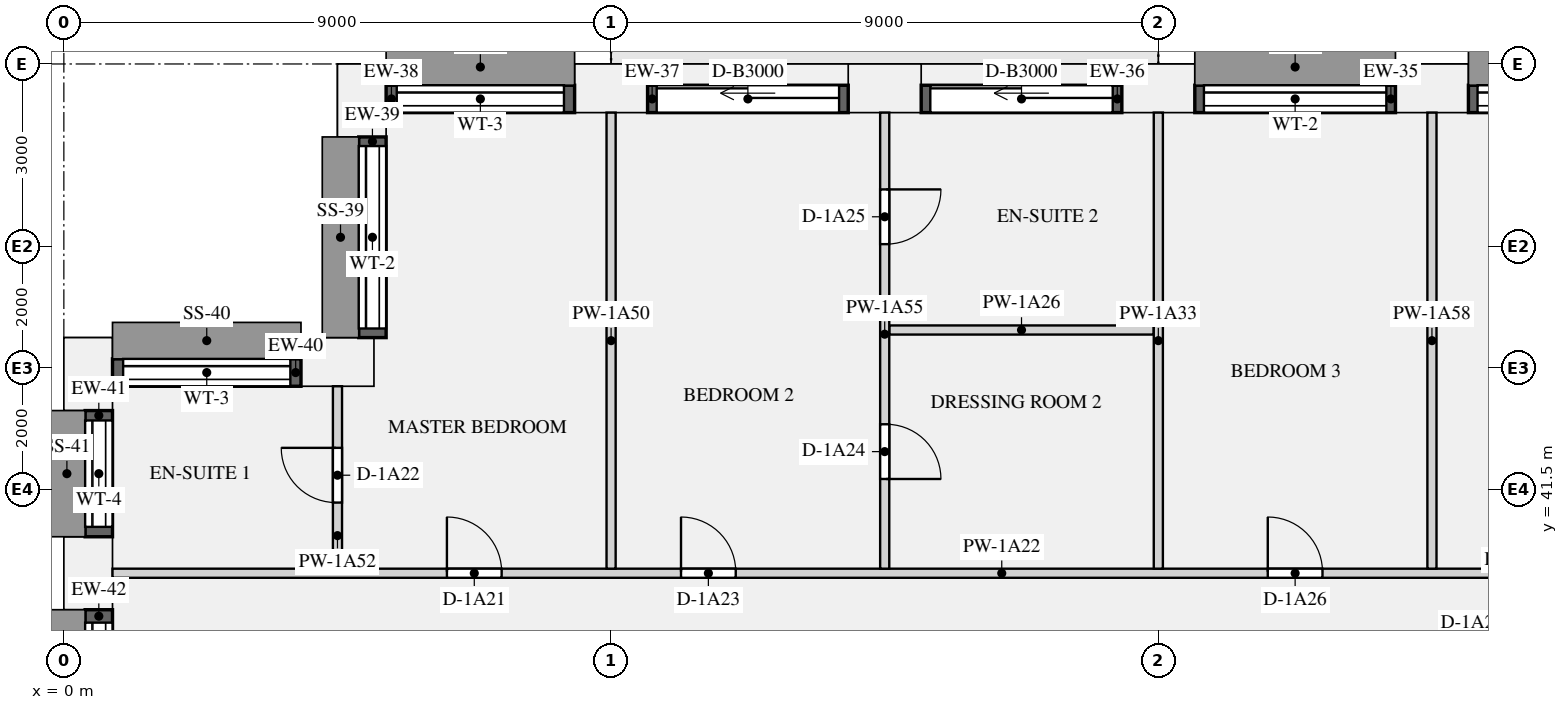
"""IFC4 building model, lengths in metres.
Left out: names, types, materials, properties, quantities, classifications, styles, units other than length and angle.
Written with IfcOpenShell. Run it as: python <this file> out.ifc"""

import sys

from ifc_helpers import new_model, si_unit, direction, frame, frame_2d, origin, origin_2d, place, context, subcontext, project, spatial, rectangle, extrude, element, fill, save


model = new_model("IFC4")
c1 = context("Model", 3, precision=1e-05, world=origin(), true_north=direction((0.0, 1.0)))
c2 = subcontext(c1, "Body", "Model", "MODEL_VIEW")
j1 = project(units=[si_unit("LENGTHUNIT", "METRE"), si_unit("PLANEANGLEUNIT", "RADIAN")], contexts=[c1])
p1 = place(None, origin())
s1 = spatial("IfcSite", under=j1, at=p1, CompositionType="ELEMENT")
p2 = place(p1, origin())
s2 = spatial("IfcBuilding", under=s1, at=p2, CompositionType="ELEMENT")
p3 = place(p2, frame((0.0, 0.0, 19.5)))
s3 = spatial("IfcBuildingStorey", under=s2, at=p3, CompositionType="ELEMENT", Elevation=19.5)
p4 = place(p3, frame((22.5, 48.1, -0.32), z_axis=(0.0, 0.0, 1.0), x_axis=(-1.0, 0.0, 0.0)))
e1 = element("IfcColumn", 1, at=p4, inside=s3, PredefinedType="USERDEFINED", context=c2, shape_type="SweptSolid", body=[
    extrude(rectangle(XDim=1.2, YDim=0.8, at=origin_2d()), origin(), (0.0, 0.0, 1.0), 3.47),
])
p5 = place(p3, frame((18.0, 48.1, 0.0), z_axis=(0.0, 0.0, 1.0), x_axis=(-1.0, 0.0, 0.0)))
e2 = element("IfcColumn", 2, at=p5, inside=s3, PredefinedType="USERDEFINED", context=c2, shape_type="SweptSolid", body=[
    extrude(rectangle(XDim=1.2, YDim=0.8, at=origin_2d()), origin(), (0.0, 0.0, 1.0), 3.15),
])
p6 = place(p3, frame((13.5, 48.1, -0.32), z_axis=(0.0, 0.0, 1.0), x_axis=(-1.0, 0.0, 0.0)))
e3 = element("IfcColumn", 3, at=p6, inside=s3, PredefinedType="USERDEFINED", context=c2, shape_type="SweptSolid", body=[
    extrude(rectangle(XDim=1.2, YDim=0.8, at=origin_2d()), origin(), (0.0, 0.0, 1.0), 3.47),
])
for number, where, z_axis, x_axis in (
    (4, (9.0, 48.1, 0.0), (0.0, 0.0, 1.0), (-1.0, 0.0, 0.0)),
    (5, (4.9, 47.9, 0.0), (0.0, 0.0, 1.0), (0.0, -1.0, 0.0)),
    (6, (4.5, 43.6, 0.0), (0.0, 0.0, 1.0), (-1.0, 0.0, 0.0)),
    (7, (0.4, 43.4, 0.0), (0.0, 0.0, 1.0), (0.0, -1.0, 0.0)),
):
    element("IfcColumn", number, at=place(p3, frame(where, z_axis=z_axis, x_axis=x_axis)), inside=s3, PredefinedType="USERDEFINED", context=c2, shape_type="SweptSolid", body=[
        extrude(rectangle(XDim=1.2, YDim=0.8, at=origin_2d()), origin(), (0.0, 0.0, 1.0), 3.15),
    ])
p7 = place(p3, frame((0.4, 40.125, -0.32), z_axis=(0.0, 0.0, 1.0), x_axis=(0.0, -1.0, 0.0)))
e8 = element("IfcColumn", 8, at=p7, inside=s3, PredefinedType="USERDEFINED", context=c2, shape_type="SweptSolid", body=[
    extrude(rectangle(XDim=1.2, YDim=0.8, at=origin_2d()), origin(), (0.0, 0.0, 1.0), 3.47),
])
p8 = place(p3, frame((26.4, 47.925, 0.9), z_axis=(0.0, 0.0, 1.0), x_axis=(-1.0, 0.0, 0.0)))
e9 = element("IfcWall", 9, at=p8, inside=s3, PredefinedType="SOLIDWALL", context=c2, shape_type="SweptSolid", body=[
    extrude(rectangle(XDim=3.3, YDim=0.45, at=frame_2d((1.65, 0.0))), origin(), (0.0, 0.0, 1.0), 1.93),
])
p9 = place(p8, frame((0.15, 0.0, 0.15)))
e10 = element("IfcOpeningElement", 10, at=p9, cuts=e9, PredefinedType="OPENING", context=c2, shape_type="SweptSolid", body=[
    extrude(rectangle(XDim=3.0, YDim=1.5, at=frame_2d((1.5, 0.75))), frame((0.0, 0.235, 0.0), z_axis=(0.0, -1.0, 0.0), x_axis=(1.0, 0.0, 0.0)), (0.0, 0.0, 1.0), 0.47),
])
p10 = place(p3, frame((21.9, 47.925, 0.9), z_axis=(0.0, 0.0, 1.0), x_axis=(-1.0, 0.0, 0.0)))
e11 = element("IfcWall", 11, at=p10, inside=s3, PredefinedType="SOLIDWALL", context=c2, shape_type="SweptSolid", body=[
    extrude(rectangle(XDim=3.3, YDim=0.45, at=frame_2d((1.65, 0.0))), origin(), (0.0, 0.0, 1.0), 1.93),
])
p11 = place(p10, frame((0.15, 0.0, 0.15)))
e12 = element("IfcOpeningElement", 12, at=p11, cuts=e11, PredefinedType="OPENING", context=c2, shape_type="SweptSolid", body=[
    extrude(rectangle(XDim=3.0, YDim=1.5, at=frame_2d((1.5, 0.75))), frame((0.0, 0.235, 0.0), z_axis=(0.0, -1.0, 0.0), x_axis=(1.0, 0.0, 0.0)), (0.0, 0.0, 1.0), 0.47),
])
p12 = place(p3, frame((17.4, 47.925, 0.0), z_axis=(0.0, 0.0, 1.0), x_axis=(-1.0, 0.0, 0.0)))
e13 = element("IfcWall", 13, at=p12, inside=s3, PredefinedType="SOLIDWALL", context=c2, shape_type="SweptSolid", body=[
    extrude(rectangle(XDim=3.3, YDim=0.45, at=frame_2d((1.65, 0.0))), origin(), (0.0, 0.0, 1.0), 2.83),
])
p13 = place(p12, frame((0.15, 0.0, 0.0)))
e14 = element("IfcOpeningElement", 14, at=p13, cuts=e13, PredefinedType="OPENING", context=c2, shape_type="SweptSolid", body=[
    extrude(rectangle(XDim=3.0, YDim=2.3, at=frame_2d((1.5, 1.15))), frame((0.0, 0.235, 0.0), z_axis=(0.0, -1.0, 0.0), x_axis=(1.0, 0.0, 0.0)), (0.0, 0.0, 1.0), 0.47),
])
p14 = place(p3, frame((12.9, 47.925, 0.0), z_axis=(0.0, 0.0, 1.0), x_axis=(-1.0, 0.0, 0.0)))
e15 = element("IfcWall", 15, at=p14, inside=s3, PredefinedType="SOLIDWALL", context=c2, shape_type="SweptSolid", body=[
    extrude(rectangle(XDim=3.3, YDim=0.45, at=frame_2d((1.65, 0.0))), origin(), (0.0, 0.0, 1.0), 2.83),
])
p15 = place(p14, frame((0.15, 0.0, 0.0)))
e16 = element("IfcOpeningElement", 16, at=p15, cuts=e15, PredefinedType="OPENING", context=c2, shape_type="SweptSolid", body=[
    extrude(rectangle(XDim=3.0, YDim=2.3, at=frame_2d((1.5, 1.15))), frame((0.0, 0.235, 0.0), z_axis=(0.0, -1.0, 0.0), x_axis=(1.0, 0.0, 0.0)), (0.0, 0.0, 1.0), 0.47),
])
p16 = place(p3, frame((8.4, 47.925, 0.9), z_axis=(0.0, 0.0, 1.0), x_axis=(-1.0, 0.0, 0.0)))
e17 = element("IfcWall", 17, at=p16, inside=s3, PredefinedType="SOLIDWALL", context=c2, shape_type="SweptSolid", body=[
    extrude(rectangle(XDim=3.1, YDim=0.45, at=frame_2d((1.55, 0.0))), origin(), (0.0, 0.0, 1.0), 1.93),
])
p17 = place(p16, frame((0.175, 0.0, 0.15)))
e18 = element("IfcOpeningElement", 18, at=p17, cuts=e17, PredefinedType="OPENING", context=c2, shape_type="SweptSolid", body=[
    extrude(rectangle(XDim=2.75, YDim=1.5, at=frame_2d((1.375, 0.75))), frame((0.0, 0.235, 0.0), z_axis=(0.0, -1.0, 0.0), x_axis=(1.0, 0.0, 0.0)), (0.0, 0.0, 1.0), 0.47),
])
p18 = place(p3, frame((5.075, 47.3, 0.9), z_axis=(0.0, 0.0, 1.0), x_axis=(0.0, -1.0, 0.0)))
e19 = element("IfcWall", 19, at=p18, inside=s3, PredefinedType="SOLIDWALL", context=c2, shape_type="SweptSolid", body=[
    extrude(rectangle(XDim=3.3, YDim=0.45, at=frame_2d((1.65, 0.0))), origin(), (0.0, 0.0, 1.0), 1.93),
])
p19 = place(p18, frame((0.15, 0.0, 0.15)))
e20 = element("IfcOpeningElement", 20, at=p19, cuts=e19, PredefinedType="OPENING", context=c2, shape_type="SweptSolid", body=[
    extrude(rectangle(XDim=3.0, YDim=1.5, at=frame_2d((1.5, 0.75))), frame((0.0, 0.235, 0.0), z_axis=(0.0, -1.0, 0.0), x_axis=(1.0, 0.0, 0.0)), (0.0, 0.0, 1.0), 0.47),
])
p20 = place(p3, frame((3.9, 43.425, 0.9), z_axis=(0.0, 0.0, 1.0), x_axis=(-1.0, 0.0, 0.0)))
e21 = element("IfcWall", 21, at=p20, inside=s3, PredefinedType="SOLIDWALL", context=c2, shape_type="SweptSolid", body=[
    extrude(rectangle(XDim=3.1, YDim=0.45, at=frame_2d((1.55, 0.0))), origin(), (0.0, 0.0, 1.0), 1.93),
])
p21 = place(p20, frame((0.175, 0.0, 0.15)))
e22 = element("IfcOpeningElement", 22, at=p21, cuts=e21, PredefinedType="OPENING", context=c2, shape_type="SweptSolid", body=[
    extrude(rectangle(XDim=2.75, YDim=1.5, at=frame_2d((1.375, 0.75))), frame((0.0, 0.235, 0.0), z_axis=(0.0, -1.0, 0.0), x_axis=(1.0, 0.0, 0.0)), (0.0, 0.0, 1.0), 0.47),
])
p22 = place(p3, frame((0.575, 42.8, 0.9), z_axis=(0.0, 0.0, 1.0), x_axis=(0.0, -1.0, 0.0)))
e23 = element("IfcWall", 23, at=p22, inside=s3, PredefinedType="SOLIDWALL", context=c2, shape_type="SweptSolid", body=[
    extrude(rectangle(XDim=2.075, YDim=0.45, at=frame_2d((1.038, 0.0))), origin(), (0.0, 0.0, 1.0), 1.93),
])
p23 = place(p22, frame((0.163, 0.0, 0.15)))
e24 = element("IfcOpeningElement", 24, at=p23, cuts=e23, PredefinedType="OPENING", context=c2, shape_type="SweptSolid", body=[
    extrude(rectangle(XDim=1.75, YDim=1.5, at=frame_2d((0.875, 0.75))), frame((0.0, 0.235, 0.0), z_axis=(0.0, -1.0, 0.0), x_axis=(1.0, 0.0, 0.0)), (0.0, 0.0, 1.0), 0.47),
])
p24 = place(p3, frame((0.575, 39.525, 0.9), z_axis=(0.0, 0.0, 1.0), x_axis=(0.0, -1.0, 0.0)))
e25 = element("IfcWall", 25, at=p24, inside=s3, PredefinedType="SOLIDWALL", context=c2, shape_type="SweptSolid", body=[
    extrude(rectangle(XDim=2.675, YDim=0.45, at=frame_2d((1.337, 0.0))), origin(), (0.0, 0.0, 1.0), 1.93),
])
p25 = place(p24, frame((0.212, 0.0, 0.15)))
e26 = element("IfcOpeningElement", 26, at=p25, cuts=e25, PredefinedType="OPENING", context=c2, shape_type="SweptSolid", body=[
    extrude(rectangle(XDim=2.25, YDim=1.5, at=frame_2d((1.125, 0.75))), frame((0.0, 0.235, 0.0), z_axis=(0.0, -1.0, 0.0), x_axis=(1.0, 0.0, 0.0)), (0.0, 0.0, 1.0), 0.47),
])
p26 = place(p3, frame((0.8, 40.125, 0.0), z_axis=(0.0, 0.0, 1.0), x_axis=(1.0, 0.0, 0.0)))
e27 = element("IfcWall", 27, at=p26, inside=s3, PredefinedType="PARTITIONING", context=c2, shape_type="SweptSolid", body=[
    extrude(rectangle(XDim=23.275, YDim=0.15, at=frame_2d((11.637, 0.0))), origin(), (0.0, 0.0, 1.0), 2.83),
])
p27 = place(p26, frame((5.5, 0.0, 0.0)))
e28 = element("IfcOpeningElement", 28, at=p27, cuts=e27, PredefinedType="OPENING", context=c2, shape_type="SweptSolid", body=[
    extrude(rectangle(XDim=0.9, YDim=2.1, at=frame_2d((0.45, 1.05))), frame((0.0, 0.085, 0.0), z_axis=(0.0, -1.0, 0.0), x_axis=(1.0, 0.0, 0.0)), (0.0, 0.0, 1.0), 0.17),
])
p28 = place(p26, frame((9.35, 0.0, 0.0)))
e29 = element("IfcOpeningElement", 29, at=p28, cuts=e27, PredefinedType="OPENING", context=c2, shape_type="SweptSolid", body=[
    extrude(rectangle(XDim=0.9, YDim=2.1, at=frame_2d((0.45, 1.05))), frame((0.0, 0.085, 0.0), z_axis=(0.0, -1.0, 0.0), x_axis=(1.0, 0.0, 0.0)), (0.0, 0.0, 1.0), 0.17),
])
p29 = place(p26, frame((19.0, 0.0, 0.0)))
e30 = element("IfcOpeningElement", 30, at=p29, cuts=e27, PredefinedType="OPENING", context=c2, shape_type="SweptSolid", body=[
    extrude(rectangle(XDim=0.9, YDim=2.1, at=frame_2d((0.45, 1.05))), frame((0.0, 0.085, 0.0), z_axis=(0.0, -1.0, 0.0), x_axis=(1.0, 0.0, 0.0)), (0.0, 0.0, 1.0), 0.17),
])
p30 = place(p3, frame((13.575, 44.125, 0.0), z_axis=(0.0, 0.0, 1.0), x_axis=(1.0, 0.0, 0.0)))
e31 = element("IfcWall", 31, at=p30, inside=s3, PredefinedType="PARTITIONING", context=c2, shape_type="SweptSolid", body=[
    extrude(rectangle(XDim=4.35, YDim=0.15, at=frame_2d((2.175, 0.0))), origin(), (0.0, 0.0, 1.0), 2.83),
])
for number, where, z_axis, x_axis in (
    (32, (18.0, 40.2, 0.0), (0.0, 0.0, 1.0), (0.0, 1.0, 0.0)),
    (33, (9.0, 40.2, 0.0), (0.0, 0.0, 1.0), (0.0, 1.0, 0.0)),
):
    element("IfcWall", number, at=place(p3, frame(where, z_axis=z_axis, x_axis=x_axis)), inside=s3, PredefinedType="PARTITIONING", context=c2, shape_type="SweptSolid", body=[
        extrude(rectangle(XDim=7.5, YDim=0.15, at=frame_2d((3.75, 0.0))), origin(), (0.0, 0.0, 1.0), 2.83),
    ])
p31 = place(p3, frame((4.5, 40.2, 0.0), z_axis=(0.0, 0.0, 1.0), x_axis=(0.0, 1.0, 0.0)))
e34 = element("IfcWall", 34, at=p31, inside=s3, PredefinedType="PARTITIONING", context=c2, shape_type="SweptSolid", body=[
    extrude(rectangle(XDim=3.0, YDim=0.15, at=frame_2d((1.5, 0.0))), origin(), (0.0, 0.0, 1.0), 2.83),
])
p32 = place(p31, frame((1.087, 0.0, 0.0)))
e35 = element("IfcOpeningElement", 35, at=p32, cuts=e34, PredefinedType="OPENING", context=c2, shape_type="SweptSolid", body=[
    extrude(rectangle(XDim=0.9, YDim=2.1, at=frame_2d((0.45, 1.05))), frame((0.0, 0.085, 0.0), z_axis=(0.0, -1.0, 0.0), x_axis=(1.0, 0.0, 0.0)), (0.0, 0.0, 1.0), 0.17),
])
p33 = place(p3, frame((13.5, 40.2, 0.0), z_axis=(0.0, 0.0, 1.0), x_axis=(0.0, 1.0, 0.0)))
e36 = element("IfcWall", 36, at=p33, inside=s3, PredefinedType="PARTITIONING", context=c2, shape_type="SweptSolid", body=[
    extrude(rectangle(XDim=7.5, YDim=0.15, at=frame_2d((3.75, 0.0))), origin(), (0.0, 0.0, 1.0), 2.83),
])
p34 = place(p33, frame((1.475, 0.0, 0.0)))
e37 = element("IfcOpeningElement", 37, at=p34, cuts=e36, PredefinedType="OPENING", context=c2, shape_type="SweptSolid", body=[
    extrude(rectangle(XDim=0.9, YDim=2.1, at=frame_2d((0.45, 1.05))), frame((0.0, 0.085, 0.0), z_axis=(0.0, -1.0, 0.0), x_axis=(1.0, 0.0, 0.0)), (0.0, 0.0, 1.0), 0.17),
])
p35 = place(p33, frame((5.337, 0.0, 0.0)))
e38 = element("IfcOpeningElement", 38, at=p35, cuts=e36, PredefinedType="OPENING", context=c2, shape_type="SweptSolid", body=[
    extrude(rectangle(XDim=0.9, YDim=2.1, at=frame_2d((0.45, 1.05))), frame((0.0, 0.085, 0.0), z_axis=(0.0, -1.0, 0.0), x_axis=(1.0, 0.0, 0.0)), (0.0, 0.0, 1.0), 0.17),
])
p36 = place(p3, frame((22.5, 40.2, 0.0), z_axis=(0.0, 0.0, 1.0), x_axis=(0.0, 1.0, 0.0)))
e39 = element("IfcWall", 39, at=p36, inside=s3, PredefinedType="PARTITIONING", context=c2, shape_type="SweptSolid", body=[
    extrude(rectangle(XDim=7.5, YDim=0.15, at=frame_2d((3.75, 0.0))), origin(), (0.0, 0.0, 1.0), 2.83),
])
p37 = place(p9, origin())
e40 = element("IfcWindow", 40, at=p37, inside=s3, PartitioningType="SINGLE_PANEL", PredefinedType="WINDOW", context=c2, shape_type="SweptSolid", body=[
    extrude(rectangle(XDim=3.0, YDim=1.5, at=frame_2d((1.5, 0.75))), frame((0.0, -0.065, 0.0), z_axis=(0.0, -1.0, 0.0), x_axis=(1.0, 0.0, 0.0)), (0.0, 0.0, 1.0), 0.06),
])
fill(e10, e40)
p38 = place(p11, origin())
e41 = element("IfcWindow", 41, at=p38, inside=s3, PartitioningType="SINGLE_PANEL", PredefinedType="WINDOW", context=c2, shape_type="SweptSolid", body=[
    extrude(rectangle(XDim=3.0, YDim=1.5, at=frame_2d((1.5, 0.75))), frame((0.0, -0.065, 0.0), z_axis=(0.0, -1.0, 0.0), x_axis=(1.0, 0.0, 0.0)), (0.0, 0.0, 1.0), 0.06),
])
fill(e12, e41)
p39 = place(p13, origin())
e42 = element("IfcDoor", 42, at=p39, inside=s3, OperationType="SLIDING_TO_LEFT", PredefinedType="DOOR", context=c2, shape_type="SweptSolid", body=[
    extrude(rectangle(XDim=3.0, YDim=2.3, at=frame_2d((1.5, 1.15))), frame((0.0, -0.07, 0.0), z_axis=(0.0, -1.0, 0.0), x_axis=(1.0, 0.0, 0.0)), (0.0, 0.0, 1.0), 0.05),
])
fill(e14, e42)
p40 = place(p15, origin())
e43 = element("IfcDoor", 43, at=p40, inside=s3, OperationType="SLIDING_TO_LEFT", PredefinedType="DOOR", context=c2, shape_type="SweptSolid", body=[
    extrude(rectangle(XDim=3.0, YDim=2.3, at=frame_2d((1.5, 1.15))), frame((0.0, -0.07, 0.0), z_axis=(0.0, -1.0, 0.0), x_axis=(1.0, 0.0, 0.0)), (0.0, 0.0, 1.0), 0.05),
])
fill(e16, e43)
p41 = place(p17, origin())
e44 = element("IfcWindow", 44, at=p41, inside=s3, PartitioningType="SINGLE_PANEL", PredefinedType="WINDOW", context=c2, shape_type="SweptSolid", body=[
    extrude(rectangle(XDim=2.75, YDim=1.5, at=frame_2d((1.375, 0.75))), frame((0.0, -0.065, 0.0), z_axis=(0.0, -1.0, 0.0), x_axis=(1.0, 0.0, 0.0)), (0.0, 0.0, 1.0), 0.06),
])
fill(e18, e44)
p42 = place(p19, origin())
e45 = element("IfcWindow", 45, at=p42, inside=s3, PartitioningType="SINGLE_PANEL", PredefinedType="WINDOW", context=c2, shape_type="SweptSolid", body=[
    extrude(rectangle(XDim=3.0, YDim=1.5, at=frame_2d((1.5, 0.75))), frame((0.0, -0.065, 0.0), z_axis=(0.0, -1.0, 0.0), x_axis=(1.0, 0.0, 0.0)), (0.0, 0.0, 1.0), 0.06),
])
fill(e20, e45)
p43 = place(p21, origin())
e46 = element("IfcWindow", 46, at=p43, inside=s3, PartitioningType="SINGLE_PANEL", PredefinedType="WINDOW", context=c2, shape_type="SweptSolid", body=[
    extrude(rectangle(XDim=2.75, YDim=1.5, at=frame_2d((1.375, 0.75))), frame((0.0, -0.065, 0.0), z_axis=(0.0, -1.0, 0.0), x_axis=(1.0, 0.0, 0.0)), (0.0, 0.0, 1.0), 0.06),
])
fill(e22, e46)
p44 = place(p23, origin())
e47 = element("IfcWindow", 47, at=p44, inside=s3, PartitioningType="SINGLE_PANEL", PredefinedType="WINDOW", context=c2, shape_type="SweptSolid", body=[
    extrude(rectangle(XDim=1.75, YDim=1.5, at=frame_2d((0.875, 0.75))), frame((0.0, -0.065, 0.0), z_axis=(0.0, -1.0, 0.0), x_axis=(1.0, 0.0, 0.0)), (0.0, 0.0, 1.0), 0.06),
])
fill(e24, e47)
p45 = place(p25, origin())
e48 = element("IfcWindow", 48, at=p45, inside=s3, PartitioningType="SINGLE_PANEL", PredefinedType="WINDOW", context=c2, shape_type="SweptSolid", body=[
    extrude(rectangle(XDim=2.25, YDim=1.5, at=frame_2d((1.125, 0.75))), frame((0.0, -0.065, 0.0), z_axis=(0.0, -1.0, 0.0), x_axis=(1.0, 0.0, 0.0)), (0.0, 0.0, 1.0), 0.06),
])
fill(e26, e48)
p46 = place(p27, origin())
e49 = element("IfcDoor", 49, at=p46, inside=s3, OperationType="SINGLE_SWING_LEFT", PredefinedType="DOOR", context=c2, shape_type="SweptSolid", body=[
    extrude(rectangle(XDim=0.9, YDim=2.1, at=frame_2d((0.45, 1.05))), frame((0.0, 0.025, 0.0), z_axis=(0.0, -1.0, 0.0), x_axis=(1.0, 0.0, 0.0)), (0.0, 0.0, 1.0), 0.05),
])
fill(e28, e49)
p47 = place(p32, origin())
e50 = element("IfcDoor", 50, at=p47, inside=s3, OperationType="SINGLE_SWING_RIGHT", PredefinedType="DOOR", context=c2, shape_type="SweptSolid", body=[
    extrude(rectangle(XDim=0.9, YDim=2.1, at=frame_2d((0.45, 1.05))), frame((0.0, 0.025, 0.0), z_axis=(0.0, -1.0, 0.0), x_axis=(1.0, 0.0, 0.0)), (0.0, 0.0, 1.0), 0.05),
])
fill(e35, e50)
p48 = place(p28, origin())
e51 = element("IfcDoor", 51, at=p48, inside=s3, OperationType="SINGLE_SWING_LEFT", PredefinedType="DOOR", context=c2, shape_type="SweptSolid", body=[
    extrude(rectangle(XDim=0.9, YDim=2.1, at=frame_2d((0.45, 1.05))), frame((0.0, 0.025, 0.0), z_axis=(0.0, -1.0, 0.0), x_axis=(1.0, 0.0, 0.0)), (0.0, 0.0, 1.0), 0.05),
])
fill(e29, e51)
p49 = place(p34, frame((0.9, 0.0, 0.0), z_axis=(0.0, 0.0, 1.0), x_axis=(-1.0, 0.0, 0.0)))
e52 = element("IfcDoor", 52, at=p49, inside=s3, OperationType="SINGLE_SWING_RIGHT", PredefinedType="DOOR", context=c2, shape_type="SweptSolid", body=[
    extrude(rectangle(XDim=0.9, YDim=2.1, at=frame_2d((0.45, 1.05))), frame((0.0, 0.025, 0.0), z_axis=(0.0, -1.0, 0.0), x_axis=(1.0, 0.0, 0.0)), (0.0, 0.0, 1.0), 0.05),
])
fill(e37, e52)
p50 = place(p35, frame((0.9, 0.0, 0.0), z_axis=(0.0, 0.0, 1.0), x_axis=(-1.0, 0.0, 0.0)))
e53 = element("IfcDoor", 53, at=p50, inside=s3, OperationType="SINGLE_SWING_LEFT", PredefinedType="DOOR", context=c2, shape_type="SweptSolid", body=[
    extrude(rectangle(XDim=0.9, YDim=2.1, at=frame_2d((0.45, 1.05))), frame((0.0, 0.025, 0.0), z_axis=(0.0, -1.0, 0.0), x_axis=(1.0, 0.0, 0.0)), (0.0, 0.0, 1.0), 0.05),
])
fill(e38, e53)
p51 = place(p29, origin())
e54 = element("IfcDoor", 54, at=p51, inside=s3, OperationType="SINGLE_SWING_LEFT", PredefinedType="DOOR", context=c2, shape_type="SweptSolid", body=[
    extrude(rectangle(XDim=0.9, YDim=2.1, at=frame_2d((0.45, 1.05))), frame((0.0, 0.025, 0.0), z_axis=(0.0, -1.0, 0.0), x_axis=(1.0, 0.0, 0.0)), (0.0, 0.0, 1.0), 0.05),
])
fill(e30, e54)
save(model, sys.argv[1])
